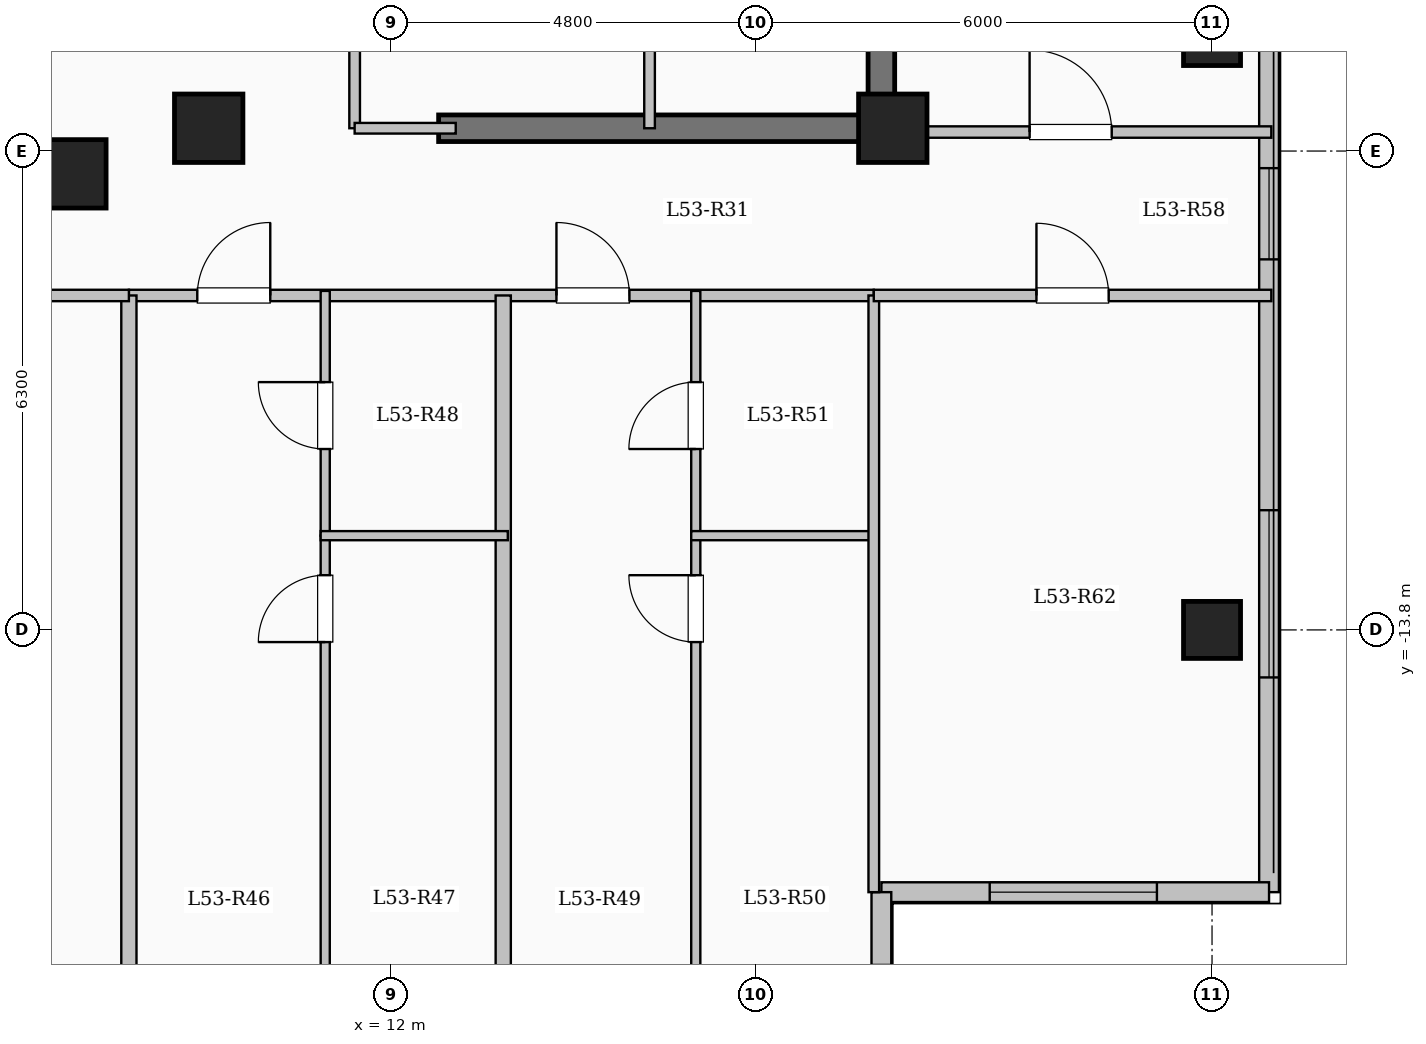
"""IFC4 building model, lengths in metres.
Left out: names, types, materials, properties, quantities, classifications, styles, units other than length and angle.
Written with IfcOpenShell. Run it as: python <this file> out.ifc"""

import sys

from ifc_helpers import new_model, si_unit, direction, frame, frame_2d, origin, origin_2d, place, context, subcontext, project, spatial, rectangle, extrude, element, fill, save


model = new_model("IFC4")
c1 = context("Model", 3, precision=1e-05, world=origin(), true_north=direction((0.0, 1.0)))
c2 = subcontext(c1, "Body", "Model", "MODEL_VIEW")
j1 = project(units=[si_unit("LENGTHUNIT", "METRE"), si_unit("PLANEANGLEUNIT", "RADIAN")], contexts=[c1])
p1 = place(None, origin())
s1 = spatial("IfcSite", under=j1, at=p1, CompositionType="ELEMENT")
p2 = place(p1, origin())
s2 = spatial("IfcBuilding", under=s1, at=p2, CompositionType="ELEMENT")
p3 = place(p2, frame((0.0, 0.0, 196.95)))
s3 = spatial("IfcBuildingStorey", under=s2, at=p3, CompositionType="ELEMENT", Elevation=196.95)
for number, where, z_axis, x_axis in (
    (1, (7.8, -7.8, 0.0), (0.0, 0.0, 1.0), (1.0, 0.0, 0.0)),
    (2, (9.6, -7.2, 0.0), (0.0, 0.0, 1.0), (1.0, 0.0, 0.0)),
    (3, (18.6, -7.2, 0.0), (0.0, 0.0, 1.0), (1.0, 0.0, 0.0)),
):
    element("IfcColumn", number, at=place(p3, frame(where, z_axis=z_axis, x_axis=x_axis)), inside=s3, PredefinedType="COLUMN", context=c2, shape_type="SweptSolid", body=[
        extrude(rectangle(XDim=0.9, YDim=0.9, at=origin_2d()), origin(), (0.0, 0.0, 1.0), 3.35),
    ])
for number, where, z_axis, x_axis in (
    (4, (22.8, -13.8, 0.0), (0.0, 0.0, 1.0), (1.0, 0.0, 0.0)),
    (5, (22.8, -6.0, 0.0), (0.0, 0.0, 1.0), (1.0, 0.0, 0.0)),
):
    element("IfcColumn", number, at=place(p3, frame(where, z_axis=z_axis, x_axis=x_axis)), inside=s3, PredefinedType="COLUMN", context=c2, shape_type="SweptSolid", body=[
        extrude(rectangle(XDim=0.75, YDim=0.75, at=origin_2d()), origin(), (0.0, 0.0, 1.0), 3.35),
    ])
p4 = place(p3, frame((23.55, 17.25, 0.0), z_axis=(0.0, 0.0, 1.0), x_axis=(0.0, -1.0, 0.0)))
e6 = element("IfcWall", 6, at=p4, inside=s3, PredefinedType="SOLIDWALL", context=c2, shape_type="SweptSolid", body=[
    extrude(rectangle(XDim=34.5, YDim=0.26, at=frame_2d((17.25, 0.0))), origin(), (0.0, 0.0, 1.0), 3.1),
])
p5 = place(p4, frame((1.375, 0.0, 0.9)))
e7 = element("IfcOpeningElement", 7, at=p5, cuts=e6, PredefinedType="OPENING", context=c2, shape_type="SweptSolid", body=[
    extrude(rectangle(XDim=2.0, YDim=1.7, at=frame_2d((1.0, 0.85))), frame((0.0, 0.14, 0.0), z_axis=(0.0, -1.0, 0.0), x_axis=(1.0, 0.0, 0.0)), (0.0, 0.0, 1.0), 0.28),
])
p6 = place(p4, frame((5.125, 0.0, 0.95)))
e8 = element("IfcOpeningElement", 8, at=p6, cuts=e6, PredefinedType="OPENING", context=c2, shape_type="SweptSolid", body=[
    extrude(rectangle(XDim=1.0, YDim=1.5, at=frame_2d((0.5, 0.75))), frame((0.0, 0.14, 0.0), z_axis=(0.0, -1.0, 0.0), x_axis=(1.0, 0.0, 0.0)), (0.0, 0.0, 1.0), 0.28),
])
p7 = place(p4, frame((14.5, 0.0, 0.9)))
e9 = element("IfcOpeningElement", 9, at=p7, cuts=e6, PredefinedType="OPENING", context=c2, shape_type="SweptSolid", body=[
    extrude(rectangle(XDim=2.0, YDim=1.7, at=frame_2d((1.0, 0.85))), frame((0.0, 0.14, 0.0), z_axis=(0.0, -1.0, 0.0), x_axis=(1.0, 0.0, 0.0)), (0.0, 0.0, 1.0), 0.28),
])
p8 = place(p4, frame((24.975, 0.0, 0.95)))
e10 = element("IfcOpeningElement", 10, at=p8, cuts=e6, PredefinedType="OPENING", context=c2, shape_type="SweptSolid", body=[
    extrude(rectangle(XDim=1.2, YDim=1.5, at=frame_2d((0.6, 0.75))), frame((0.0, 0.14, 0.0), z_axis=(0.0, -1.0, 0.0), x_axis=(1.0, 0.0, 0.0)), (0.0, 0.0, 1.0), 0.28),
])
p9 = place(p4, frame((29.475, 0.0, 0.9)))
e11 = element("IfcOpeningElement", 11, at=p9, cuts=e6, PredefinedType="OPENING", context=c2, shape_type="SweptSolid", body=[
    extrude(rectangle(XDim=2.2, YDim=1.75, at=frame_2d((1.1, 0.875))), frame((0.0, 0.14, 0.0), z_axis=(0.0, -1.0, 0.0), x_axis=(1.0, 0.0, 0.0)), (0.0, 0.0, 1.0), 0.28),
])
p10 = place(p3, frame((23.55, -17.25, 0.0), z_axis=(0.0, 0.0, 1.0), x_axis=(-1.0, 0.0, 0.0)))
e12 = element("IfcWall", 12, at=p10, inside=s3, PredefinedType="SOLIDWALL", context=c2, shape_type="SweptSolid", body=[
    extrude(rectangle(XDim=5.1, YDim=0.26, at=frame_2d((2.55, 0.0))), origin(), (0.0, 0.0, 1.0), 3.1),
])
p11 = place(p10, frame((1.475, 0.0, 0.9)))
e13 = element("IfcOpeningElement", 13, at=p11, cuts=e12, PredefinedType="OPENING", context=c2, shape_type="SweptSolid", body=[
    extrude(rectangle(XDim=2.2, YDim=1.75, at=frame_2d((1.1, 0.875))), frame((0.0, 0.14, 0.0), z_axis=(0.0, -1.0, 0.0), x_axis=(1.0, 0.0, 0.0)), (0.0, 0.0, 1.0), 0.28),
])
p12 = place(p3, frame((18.45, -17.25, 0.0), z_axis=(0.0, 0.0, 1.0), x_axis=(0.0, -1.0, 0.0)))
e14 = element("IfcWall", 14, at=p12, inside=s3, PredefinedType="SOLIDWALL", context=c2, shape_type="SweptSolid", body=[
    extrude(rectangle(XDim=3.6, YDim=0.26, at=frame_2d((1.8, 0.0))), origin(), (0.0, 0.0, 1.0), 3.1),
])
p13 = place(p12, frame((0.958, 0.0, 0.9)))
e15 = element("IfcOpeningElement", 15, at=p13, cuts=e14, PredefinedType="OPENING", context=c2, shape_type="SweptSolid", body=[
    extrude(rectangle(XDim=1.65, YDim=1.6, at=frame_2d((0.825, 0.8))), frame((0.0, 0.14, 0.0), z_axis=(0.0, -1.0, 0.0), x_axis=(1.0, 0.0, 0.0)), (0.0, 0.0, 1.0), 0.28),
])
p14 = place(p3, frame((18.45, -7.375, 0.0), z_axis=(0.0, 0.0, 1.0), x_axis=(0.0, 1.0, 0.0)))
e16 = element("IfcWall", 16, at=p14, inside=s3, PredefinedType="SHEAR", context=c2, shape_type="SweptSolid", body=[
    extrude(rectangle(XDim=14.05, YDim=0.35, at=frame_2d((7.025, 0.0))), origin(), (0.0, 0.0, 1.0), 3.35),
])
p15 = place(p3, frame((12.625, -7.2, 0.0), z_axis=(0.0, 0.0, 1.0), x_axis=(1.0, 0.0, 0.0)))
e17 = element("IfcWall", 17, at=p15, inside=s3, PredefinedType="SHEAR", context=c2, shape_type="SweptSolid", body=[
    extrude(rectangle(XDim=6.0, YDim=0.35, at=frame_2d((3.0, 0.0))), origin(), (0.0, 0.0, 1.0), 3.35),
])
p16 = place(p3, frame((15.4, -7.2, 0.0), z_axis=(0.0, 0.0, 1.0), x_axis=(0.0, 1.0, 0.0)))
e18 = element("IfcWall", 18, at=p16, inside=s3, PredefinedType="PARTITIONING", context=c2, shape_type="SweptSolid", body=[
    extrude(rectangle(XDim=10.45, YDim=0.14, at=frame_2d((5.225, 0.0))), origin(), (0.0, 0.0, 1.0), 3.1),
])
p17 = place(p16, frame((9.25, 0.0, 0.0)))
e19 = element("IfcOpeningElement", 19, at=p17, cuts=e18, PredefinedType="OPENING", context=c2, shape_type="SweptSolid", body=[
    extrude(rectangle(XDim=0.9, YDim=2.08, at=frame_2d((0.45, 1.04))), frame((0.0, 0.08, 0.0), z_axis=(0.0, -1.0, 0.0), x_axis=(1.0, 0.0, 0.0)), (0.0, 0.0, 1.0), 0.16),
])
p18 = place(p3, frame((11.52, -7.2, 0.0), z_axis=(0.0, 0.0, 1.0), x_axis=(0.0, 1.0, 0.0)))
e20 = element("IfcWall", 20, at=p18, inside=s3, PredefinedType="PARTITIONING", context=c2, shape_type="SweptSolid", body=[
    extrude(rectangle(XDim=9.12, YDim=0.14, at=frame_2d((4.56, 0.0))), origin(), (0.0, 0.0, 1.0), 3.1),
])
p19 = place(p18, frame((3.8, 0.0, 0.0)))
e21 = element("IfcOpeningElement", 21, at=p19, cuts=e20, PredefinedType="OPENING", context=c2, shape_type="SweptSolid", body=[
    extrude(rectangle(XDim=0.9, YDim=2.08, at=frame_2d((0.45, 1.04))), frame((0.0, 0.08, 0.0), z_axis=(0.0, -1.0, 0.0), x_axis=(1.0, 0.0, 0.0)), (0.0, 0.0, 1.0), 0.16),
])
p20 = place(p3, frame((11.52, -7.2, 0.0), z_axis=(0.0, 0.0, 1.0), x_axis=(1.0, 0.0, 0.0)))
e22 = element("IfcWall", 22, at=p20, inside=s3, PredefinedType="PARTITIONING", context=c2, shape_type="SweptSolid", body=[
    extrude(rectangle(XDim=1.33, YDim=0.14, at=frame_2d((0.665, 0.0))), origin(), (0.0, 0.0, 1.0), 2.235),
])
p21 = place(p3, frame((8.55, -9.4, 0.0), z_axis=(0.0, 0.0, 1.0), x_axis=(1.0, 0.0, 0.0)))
e23 = element("IfcWall", 23, at=p21, inside=s3, PredefinedType="PARTITIONING", context=c2, shape_type="SweptSolid", body=[
    extrude(rectangle(XDim=9.8, YDim=0.15, at=frame_2d((4.9, 0.0))), origin(), (0.0, 0.0, 1.0), 3.1),
])
p22 = place(p21, frame((0.9, 0.0, 0.0)))
e24 = element("IfcOpeningElement", 24, at=p22, cuts=e23, PredefinedType="OPENING", context=c2, shape_type="SweptSolid", body=[
    extrude(rectangle(XDim=0.96, YDim=2.15, at=frame_2d((0.48, 1.075))), frame((0.0, 0.085, 0.0), z_axis=(0.0, -1.0, 0.0), x_axis=(1.0, 0.0, 0.0)), (0.0, 0.0, 1.0), 0.17),
])
p23 = place(p21, frame((5.625, 0.0, 0.0)))
e25 = element("IfcOpeningElement", 25, at=p23, cuts=e23, PredefinedType="OPENING", context=c2, shape_type="SweptSolid", body=[
    extrude(rectangle(XDim=0.96, YDim=2.15, at=frame_2d((0.48, 1.075))), frame((0.0, 0.085, 0.0), z_axis=(0.0, -1.0, 0.0), x_axis=(1.0, 0.0, 0.0)), (0.0, 0.0, 1.0), 0.17),
])
p24 = place(p3, frame((13.475, -20.9, 0.0), z_axis=(0.0, 0.0, 1.0), x_axis=(0.0, 1.0, 0.0)))
e26 = element("IfcWall", 26, at=p24, inside=s3, PredefinedType="SOLIDWALL", context=c2, shape_type="SweptSolid", body=[
    extrude(rectangle(XDim=11.5, YDim=0.2, at=frame_2d((5.75, 0.0))), origin(), (0.0, 0.0, 1.0), 3.1),
])
p25 = place(p3, frame((11.133, -20.9, 0.0), z_axis=(0.0, 0.0, 1.0), x_axis=(0.0, 1.0, 0.0)))
e27 = element("IfcWall", 27, at=p25, inside=s3, PredefinedType="PARTITIONING", context=c2, shape_type="SweptSolid", body=[
    extrude(rectangle(XDim=8.34, YDim=0.12, at=frame_2d((4.17, 0.0))), origin(), (0.0, 0.0, 1.0), 3.1),
])
p26 = place(p25, frame((6.94, 0.0, 0.0)))
e28 = element("IfcOpeningElement", 28, at=p26, cuts=e27, PredefinedType="OPENING", context=c2, shape_type="SweptSolid", body=[
    extrude(rectangle(XDim=0.88, YDim=2.1, at=frame_2d((0.44, 1.05))), frame((0.0, 0.07, 0.0), z_axis=(0.0, -1.0, 0.0), x_axis=(1.0, 0.0, 0.0)), (0.0, 0.0, 1.0), 0.14),
])
p27 = place(p3, frame((11.133, -12.56, 0.0), z_axis=(0.0, 0.0, 1.0), x_axis=(0.0, 1.0, 0.0)))
e29 = element("IfcWall", 29, at=p27, inside=s3, PredefinedType="PARTITIONING", context=c2, shape_type="SweptSolid", body=[
    extrude(rectangle(XDim=3.22, YDim=0.12, at=frame_2d((1.61, 0.0))), origin(), (0.0, 0.0, 1.0), 3.1),
])
p28 = place(p27, frame((1.14, 0.0, 0.0)))
e30 = element("IfcOpeningElement", 30, at=p28, cuts=e29, PredefinedType="OPENING", context=c2, shape_type="SweptSolid", body=[
    extrude(rectangle(XDim=0.88, YDim=2.1, at=frame_2d((0.44, 1.05))), frame((0.0, 0.07, 0.0), z_axis=(0.0, -1.0, 0.0), x_axis=(1.0, 0.0, 0.0)), (0.0, 0.0, 1.0), 0.14),
])
p29 = place(p3, frame((11.073, -12.56, 0.0), z_axis=(0.0, 0.0, 1.0), x_axis=(1.0, 0.0, 0.0)))
e31 = element("IfcWall", 31, at=p29, inside=s3, PredefinedType="PARTITIONING", context=c2, shape_type="SweptSolid", body=[
    extrude(rectangle(XDim=2.462, YDim=0.12, at=frame_2d((1.231, 0.0))), origin(), (0.0, 0.0, 1.0), 2.725),
])
p30 = place(p3, frame((16.008, -20.9, 0.0), z_axis=(0.0, 0.0, 1.0), x_axis=(0.0, 1.0, 0.0)))
e32 = element("IfcWall", 32, at=p30, inside=s3, PredefinedType="PARTITIONING", context=c2, shape_type="SweptSolid", body=[
    extrude(rectangle(XDim=8.34, YDim=0.12, at=frame_2d((4.17, 0.0))), origin(), (0.0, 0.0, 1.0), 3.1),
])
p31 = place(p30, frame((6.94, 0.0, 0.0)))
e33 = element("IfcOpeningElement", 33, at=p31, cuts=e32, PredefinedType="OPENING", context=c2, shape_type="SweptSolid", body=[
    extrude(rectangle(XDim=0.88, YDim=2.1, at=frame_2d((0.44, 1.05))), frame((0.0, 0.07, 0.0), z_axis=(0.0, -1.0, 0.0), x_axis=(1.0, 0.0, 0.0)), (0.0, 0.0, 1.0), 0.14),
])
p32 = place(p3, frame((16.008, -12.56, 0.0), z_axis=(0.0, 0.0, 1.0), x_axis=(0.0, 1.0, 0.0)))
e34 = element("IfcWall", 34, at=p32, inside=s3, PredefinedType="PARTITIONING", context=c2, shape_type="SweptSolid", body=[
    extrude(rectangle(XDim=3.22, YDim=0.12, at=frame_2d((1.61, 0.0))), origin(), (0.0, 0.0, 1.0), 3.1),
])
p33 = place(p32, frame((1.14, 0.0, 0.0)))
e35 = element("IfcOpeningElement", 35, at=p33, cuts=e34, PredefinedType="OPENING", context=c2, shape_type="SweptSolid", body=[
    extrude(rectangle(XDim=0.88, YDim=2.1, at=frame_2d((0.44, 1.05))), frame((0.0, 0.07, 0.0), z_axis=(0.0, -1.0, 0.0), x_axis=(1.0, 0.0, 0.0)), (0.0, 0.0, 1.0), 0.14),
])
p34 = place(p3, frame((15.948, -12.56, 0.0), z_axis=(0.0, 0.0, 1.0), x_axis=(1.0, 0.0, 0.0)))
e36 = element("IfcWall", 36, at=p34, inside=s3, PredefinedType="PARTITIONING", context=c2, shape_type="SweptSolid", body=[
    extrude(rectangle(XDim=2.462, YDim=0.12, at=frame_2d((1.231, 0.0))), origin(), (0.0, 0.0, 1.0), 3.1),
])
p35 = place(p3, frame((8.55, -21.504, 0.0), z_axis=(0.0, 0.0, 1.0), x_axis=(0.0, 1.0, 0.0)))
e37 = element("IfcWall", 37, at=p35, inside=s3, PredefinedType="SOLIDWALL", context=c2, shape_type="SweptSolid", body=[
    extrude(rectangle(XDim=12.104, YDim=0.2, at=frame_2d((6.052, 0.0))), origin(), (0.0, 0.0, 1.0), 3.1),
])
p36 = place(p3, frame((-8.55, -9.4, 0.0), z_axis=(0.0, 0.0, 1.0), x_axis=(1.0, 0.0, 0.0)))
e38 = element("IfcWall", 38, at=p36, inside=s3, PredefinedType="PARTITIONING", context=c2, shape_type="SweptSolid", body=[
    extrude(rectangle(XDim=17.1, YDim=0.15, at=frame_2d((8.55, 0.0))), origin(), (0.0, 0.0, 1.0), 3.1),
])
p37 = place(p36, frame((1.9, 0.0, 0.0)))
e39 = element("IfcOpeningElement", 39, at=p37, cuts=e38, PredefinedType="OPENING", context=c2, shape_type="SweptSolid", body=[
    extrude(rectangle(XDim=0.95, YDim=2.15, at=frame_2d((0.475, 1.075))), frame((0.0, 0.085, 0.0), z_axis=(0.0, -1.0, 0.0), x_axis=(1.0, 0.0, 0.0)), (0.0, 0.0, 1.0), 0.17),
])
p38 = place(p36, frame((10.5, 0.0, 0.0)))
e40 = element("IfcOpeningElement", 40, at=p38, cuts=e38, PredefinedType="OPENING", context=c2, shape_type="SweptSolid", body=[
    extrude(rectangle(XDim=0.95, YDim=2.15, at=frame_2d((0.475, 1.075))), frame((0.0, 0.085, 0.0), z_axis=(0.0, -1.0, 0.0), x_axis=(1.0, 0.0, 0.0)), (0.0, 0.0, 1.0), 0.17),
])
p39 = place(p3, frame((18.45, -7.25, 0.0), z_axis=(0.0, 0.0, 1.0), x_axis=(1.0, 0.0, 0.0)))
e41 = element("IfcWall", 41, at=p39, inside=s3, PredefinedType="PARTITIONING", context=c2, shape_type="SweptSolid", body=[
    extrude(rectangle(XDim=5.13, YDim=0.15, at=frame_2d((2.565, 0.0))), origin(), (0.0, 0.0, 1.0), 3.1),
])
p40 = place(p39, frame((1.95, 0.0, 0.0)))
e42 = element("IfcOpeningElement", 42, at=p40, cuts=e41, PredefinedType="OPENING", context=c2, shape_type="SweptSolid", body=[
    extrude(rectangle(XDim=1.08, YDim=2.15, at=frame_2d((0.54, 1.075))), frame((0.0, 0.085, 0.0), z_axis=(0.0, -1.0, 0.0), x_axis=(1.0, 0.0, 0.0)), (0.0, 0.0, 1.0), 0.17),
])
p41 = place(p3, frame((18.35, -17.25, 0.0), z_axis=(0.0, 0.0, 1.0), x_axis=(0.0, 1.0, 0.0)))
e43 = element("IfcWall", 43, at=p41, inside=s3, PredefinedType="PARTITIONING", context=c2, shape_type="SweptSolid", body=[
    extrude(rectangle(XDim=7.85, YDim=0.14, at=frame_2d((3.925, 0.0))), origin(), (0.0, 0.0, 1.0), 3.1),
])
p42 = place(p3, frame((18.35, -9.4, 0.0), z_axis=(0.0, 0.0, 1.0), x_axis=(1.0, 0.0, 0.0)))
e44 = element("IfcWall", 44, at=p42, inside=s3, PredefinedType="PARTITIONING", context=c2, shape_type="SweptSolid", body=[
    extrude(rectangle(XDim=5.23, YDim=0.15, at=frame_2d((2.615, 0.0))), origin(), (0.0, 0.0, 1.0), 3.1),
])
p43 = place(p42, frame((2.14, 0.0, 0.0)))
e45 = element("IfcOpeningElement", 45, at=p43, cuts=e44, PredefinedType="OPENING", context=c2, shape_type="SweptSolid", body=[
    extrude(rectangle(XDim=0.95, YDim=2.15, at=frame_2d((0.475, 1.075))), frame((0.0, 0.085, 0.0), z_axis=(0.0, -1.0, 0.0), x_axis=(1.0, 0.0, 0.0)), (0.0, 0.0, 1.0), 0.17),
])
p44 = place(p8, origin())
e46 = element("IfcWindow", 46, at=p44, inside=s3, PartitioningType="SINGLE_PANEL", PredefinedType="WINDOW", context=c2, shape_type="SweptSolid", body=[
    extrude(rectangle(XDim=1.2, YDim=1.5, at=frame_2d((0.6, 0.75))), frame((0.0, 0.03, 0.0), z_axis=(0.0, -1.0, 0.0), x_axis=(1.0, 0.0, 0.0)), (0.0, 0.0, 1.0), 0.06),
])
fill(e10, e46)
p45 = place(p9, origin())
e47 = element("IfcWindow", 47, at=p45, inside=s3, PartitioningType="SINGLE_PANEL", PredefinedType="WINDOW", context=c2, shape_type="SweptSolid", body=[
    extrude(rectangle(XDim=2.2, YDim=1.75, at=frame_2d((1.1, 0.875))), frame((0.0, 0.03, 0.0), z_axis=(0.0, -1.0, 0.0), x_axis=(1.0, 0.0, 0.0)), (0.0, 0.0, 1.0), 0.06),
])
fill(e11, e47)
p46 = place(p11, origin())
e48 = element("IfcWindow", 48, at=p46, inside=s3, PartitioningType="SINGLE_PANEL", PredefinedType="WINDOW", context=c2, shape_type="SweptSolid", body=[
    extrude(rectangle(XDim=2.2, YDim=1.75, at=frame_2d((1.1, 0.875))), frame((0.0, 0.03, 0.0), z_axis=(0.0, -1.0, 0.0), x_axis=(1.0, 0.0, 0.0)), (0.0, 0.0, 1.0), 0.06),
])
fill(e13, e48)
p47 = place(p22, origin())
e49 = element("IfcDoor", 49, at=p47, inside=s3, OperationType="SINGLE_SWING_RIGHT", PredefinedType="DOOR", context=c2, shape_type="SweptSolid", body=[
    extrude(rectangle(XDim=0.96, YDim=2.15, at=frame_2d((0.48, 1.075))), frame((0.0, 0.025, 0.0), z_axis=(0.0, -1.0, 0.0), x_axis=(1.0, 0.0, 0.0)), (0.0, 0.0, 1.0), 0.05),
])
fill(e24, e49)
p48 = place(p26, origin())
e50 = element("IfcDoor", 50, at=p48, inside=s3, OperationType="SINGLE_SWING_LEFT", PredefinedType="DOOR", context=c2, shape_type="SweptSolid", body=[
    extrude(rectangle(XDim=0.88, YDim=2.1, at=frame_2d((0.44, 1.05))), frame((0.0, 0.025, 0.0), z_axis=(0.0, -1.0, 0.0), x_axis=(1.0, 0.0, 0.0)), (0.0, 0.0, 1.0), 0.05),
])
fill(e28, e50)
p49 = place(p28, origin())
e51 = element("IfcDoor", 51, at=p49, inside=s3, OperationType="SINGLE_SWING_RIGHT", PredefinedType="DOOR", context=c2, shape_type="SweptSolid", body=[
    extrude(rectangle(XDim=0.88, YDim=2.1, at=frame_2d((0.44, 1.05))), frame((0.0, 0.025, 0.0), z_axis=(0.0, -1.0, 0.0), x_axis=(1.0, 0.0, 0.0)), (0.0, 0.0, 1.0), 0.05),
])
fill(e30, e51)
p50 = place(p23, origin())
e52 = element("IfcDoor", 52, at=p50, inside=s3, OperationType="SINGLE_SWING_LEFT", PredefinedType="DOOR", context=c2, shape_type="SweptSolid", body=[
    extrude(rectangle(XDim=0.96, YDim=2.15, at=frame_2d((0.48, 1.075))), frame((0.0, 0.025, 0.0), z_axis=(0.0, -1.0, 0.0), x_axis=(1.0, 0.0, 0.0)), (0.0, 0.0, 1.0), 0.05),
])
fill(e25, e52)
p51 = place(p31, origin())
e53 = element("IfcDoor", 53, at=p51, inside=s3, OperationType="SINGLE_SWING_RIGHT", PredefinedType="DOOR", context=c2, shape_type="SweptSolid", body=[
    extrude(rectangle(XDim=0.88, YDim=2.1, at=frame_2d((0.44, 1.05))), frame((0.0, 0.025, 0.0), z_axis=(0.0, -1.0, 0.0), x_axis=(1.0, 0.0, 0.0)), (0.0, 0.0, 1.0), 0.05),
])
fill(e33, e53)
p52 = place(p33, origin())
e54 = element("IfcDoor", 54, at=p52, inside=s3, OperationType="SINGLE_SWING_LEFT", PredefinedType="DOOR", context=c2, shape_type="SweptSolid", body=[
    extrude(rectangle(XDim=0.88, YDim=2.1, at=frame_2d((0.44, 1.05))), frame((0.0, 0.025, 0.0), z_axis=(0.0, -1.0, 0.0), x_axis=(1.0, 0.0, 0.0)), (0.0, 0.0, 1.0), 0.05),
])
fill(e35, e54)
p53 = place(p43, origin())
e55 = element("IfcDoor", 55, at=p53, inside=s3, OperationType="SINGLE_SWING_LEFT", PredefinedType="DOOR", context=c2, shape_type="SweptSolid", body=[
    extrude(rectangle(XDim=0.95, YDim=2.15, at=frame_2d((0.475, 1.075))), frame((0.0, 0.025, 0.0), z_axis=(0.0, -1.0, 0.0), x_axis=(1.0, 0.0, 0.0)), (0.0, 0.0, 1.0), 0.05),
])
fill(e45, e55)
p54 = place(p40, origin())
e56 = element("IfcDoor", 56, at=p54, inside=s3, OperationType="SINGLE_SWING_LEFT", PredefinedType="DOOR", context=c2, shape_type="SweptSolid", body=[
    extrude(rectangle(XDim=1.08, YDim=2.15, at=frame_2d((0.54, 1.075))), frame((0.0, 0.025, 0.0), z_axis=(0.0, -1.0, 0.0), x_axis=(1.0, 0.0, 0.0)), (0.0, 0.0, 1.0), 0.05),
])
fill(e42, e56)
save(model, sys.argv[1])
